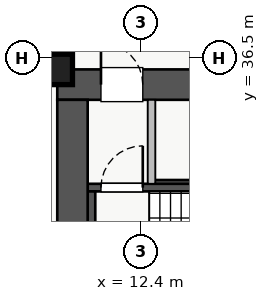
"""IFC4 building model, lengths in metres.
Left out: names, types, materials, properties, quantities, classifications, styles, units other than length and angle.
Written with IfcOpenShell. Run it as: python <this file> out.ifc"""

import sys

from ifc_helpers import new_model, si_unit, direction, frame, frame_2d, origin, origin_2d, place, context, subcontext, project, spatial, rectangle, extrude, source, transform, mapped, element, fill, save


model = new_model("IFC4")
c1 = context("Model", 3, precision=1e-05, world=origin(), true_north=direction((0.0, 1.0)))
c2 = subcontext(c1, "Body", "Model", "MODEL_VIEW")
j1 = project(units=[si_unit("LENGTHUNIT", "METRE"), si_unit("PLANEANGLEUNIT", "RADIAN")], contexts=[c1])
p1 = place(None, origin())
s1 = spatial("IfcSite", under=j1, at=p1, CompositionType="ELEMENT")
p2 = place(p1, origin())
s2 = spatial("IfcBuilding", under=s1, at=p2, CompositionType="ELEMENT")
p3 = place(p2, frame((0.0, 0.0, -4.8)))
s3 = spatial("IfcBuildingStorey", under=s2, at=p3, CompositionType="ELEMENT", Elevation=-4.8)
p4 = place(p3, frame((12.68, 33.2, 0.0), z_axis=(0.0, 0.0, 1.0), x_axis=(1.0, 0.0, 0.0)))
e1 = element("IfcWall", 1, at=p4, inside=s3, PredefinedType="SHEAR", context=c2, shape_type="SweptSolid", body=[
    extrude(rectangle(XDim=1.94, YDim=0.18, at=frame_2d((0.97, 0.0))), origin(), (0.0, 0.0, 1.0), 4.58),
])
p5 = place(p3, frame((11.0, 33.09, 0.0), z_axis=(0.0, 0.0, 1.0), x_axis=(1.0, 0.0, 0.0)))
e2 = element("IfcWall", 2, at=p5, inside=s3, PredefinedType="SHEAR", context=c2, shape_type="SweptSolid", body=[
    extrude(rectangle(XDim=7.15, YDim=0.2, at=frame_2d((3.575, 0.0))), origin(), (0.0, 0.0, 1.0), 4.8),
])
p6 = place(p5, frame((0.35, 0.0, 0.0)))
e3 = element("IfcOpeningElement", 3, at=p6, cuts=e2, PredefinedType="OPENING", context=c2, shape_type="SweptSolid", body=[
    extrude(rectangle(XDim=1.1, YDim=2.05, at=frame_2d((0.55, 1.025))), frame((0.0, 0.11, 0.0), z_axis=(0.0, -1.0, 0.0), x_axis=(1.0, 0.0, 0.0)), (0.0, 0.0, 1.0), 0.22),
])
p7 = place(p3, frame((11.1, 30.05, 0.0), z_axis=(0.0, 0.0, 1.0), x_axis=(0.0, 1.0, 0.0)))
e4 = element("IfcWall", 4, at=p7, inside=s3, PredefinedType="SHEAR", context=c2, shape_type="SweptSolid", body=[
    extrude(rectangle(XDim=2.94, YDim=0.2, at=frame_2d((1.47, 0.0))), origin(), (0.0, 0.0, 1.0), 4.8),
])
p8 = place(p3, frame((10.2, 35.8, 0.0), z_axis=(0.0, 0.0, 1.0), x_axis=(1.0, 0.0, 0.0)))
e5 = element("IfcWall", 5, at=p8, inside=s3, PredefinedType="SHEAR", context=c2, shape_type="SweptSolid", body=[
    extrude(rectangle(XDim=17.6, YDim=0.8, at=frame_2d((8.8, 0.0))), origin(), (0.0, 0.0, 1.0), 4.8),
])
p9 = place(p8, frame((1.15, 0.0, 0.0)))
e6 = element("IfcOpeningElement", 6, at=p9, cuts=e5, PredefinedType="OPENING", context=c2, shape_type="SweptSolid", body=[
    extrude(rectangle(XDim=1.1, YDim=2.05, at=frame_2d((0.55, 1.025))), frame((0.0, 0.41, 0.0), z_axis=(0.0, -1.0, 0.0), x_axis=(1.0, 0.0, 0.0)), (0.0, 0.0, 1.0), 0.82),
])
p10 = place(p8, frame((8.3, 0.0, 0.0)))
e7 = element("IfcOpeningElement", 7, at=p10, cuts=e5, PredefinedType="OPENING", context=c2, shape_type="SweptSolid", body=[
    extrude(rectangle(XDim=1.1, YDim=2.05, at=frame_2d((0.55, 1.025))), frame((0.0, 0.41, 0.0), z_axis=(0.0, -1.0, 0.0), x_axis=(1.0, 0.0, 0.0)), (0.0, 0.0, 1.0), 0.82),
])
p11 = place(p8, frame((10.05, 0.0, 0.0)))
e8 = element("IfcOpeningElement", 8, at=p11, cuts=e5, PredefinedType="OPENING", context=c2, shape_type="SweptSolid", body=[
    extrude(rectangle(XDim=1.1, YDim=2.05, at=frame_2d((0.55, 1.025))), frame((0.0, 0.41, 0.0), z_axis=(0.0, -1.0, 0.0), x_axis=(1.0, 0.0, 0.0)), (0.0, 0.0, 1.0), 0.82),
])
p12 = place(p8, frame((14.74, 0.0, 0.0)))
e9 = element("IfcOpeningElement", 9, at=p12, cuts=e5, PredefinedType="OPENING", context=c2, shape_type="SweptSolid", body=[
    extrude(rectangle(XDim=1.0, YDim=2.05, at=frame_2d((0.5, 1.025))), frame((0.0, 0.41, 0.0), z_axis=(0.0, -1.0, 0.0), x_axis=(1.0, 0.0, 0.0)), (0.0, 0.0, 1.0), 0.82),
])
p13 = place(p8, frame((12.585, 0.0, 0.0)))
e10 = element("IfcOpeningElement", 10, at=p13, cuts=e5, PredefinedType="OPENING", context=c2, shape_type="SweptSolid", body=[
    extrude(rectangle(XDim=1.0, YDim=2.05, at=frame_2d((0.5, 1.025))), frame((0.0, 0.41, 0.0), z_axis=(0.0, -1.0, 0.0), x_axis=(1.0, 0.0, 0.0)), (0.0, 0.0, 1.0), 0.82),
])
p14 = place(p3, frame((10.6, 29.8, 0.0), z_axis=(0.0, 0.0, 1.0), x_axis=(0.0, 1.0, 0.0)))
e11 = element("IfcWall", 11, at=p14, inside=s3, PredefinedType="SHEAR", context=c2, shape_type="SweptSolid", body=[
    extrude(rectangle(XDim=5.6, YDim=0.8, at=frame_2d((2.8, 0.0))), origin(), (0.0, 0.0, 1.0), 4.8),
])
m1 = source(origin(), c2, "Body", "SweptSolid", [
    extrude(rectangle(XDim=0.8, YDim=0.8, at=origin_2d()), origin(), (0.0, 0.0, 1.0), 4.8),
])
p15 = place(p3, frame((10.2, 36.2, 0.0), z_axis=(0.0, 0.0, 1.0), x_axis=(1.0, 0.0, 0.0)))
e12 = element("IfcColumn", 12, at=p15, inside=s3, PredefinedType="PILASTER", context=c2, shape_type="MappedRepresentation", body=[
    mapped(m1, transform((0.0, 0.0, 0.0), x_axis=(1.0, 0.0, 0.0), y_axis=(0.0, 1.0, 0.0), z_axis=(0.0, 0.0, 1.0), scale=1.0)),
])
p16 = place(p3, frame((12.68, 33.19, 0.0), z_axis=(0.0, 0.0, 1.0), x_axis=(0.0, 1.0, 0.0)))
e13 = element("IfcWall", 13, at=p16, inside=s3, PredefinedType="PARTITIONING", context=c2, shape_type="SweptSolid", body=[
    extrude(rectangle(XDim=2.21, YDim=0.2, at=frame_2d((1.105, 0.0))), origin(), (0.0, 0.0, 1.0), 4.58),
])
m2 = source(origin(), c2, "Body", "SweptSolid", [
    extrude(rectangle(XDim=1.1, YDim=2.05, at=frame_2d((0.55, 1.025))), frame((0.0, 0.025, 0.0), z_axis=(0.0, -1.0, 0.0), x_axis=(1.0, 0.0, 0.0)), (0.0, 0.0, 1.0), 0.05),
])
p17 = place(p9, origin())
e14 = element("IfcDoor", 14, at=p17, inside=s3, OperationType="SINGLE_SWING_LEFT", PredefinedType="DOOR", context=c2, shape_type="MappedRepresentation", body=[
    mapped(m2, transform((0.0, 0.0, 0.0), x_axis=(1.0, 0.0, 0.0), y_axis=(0.0, 1.0, 0.0), z_axis=(0.0, 0.0, 1.0), scale=1.0)),
])
fill(e6, e14)
p18 = place(p6, origin())
e15 = element("IfcDoor", 15, at=p18, inside=s3, OperationType="SINGLE_SWING_RIGHT", PredefinedType="DOOR", context=c2, shape_type="MappedRepresentation", body=[
    mapped(m2, transform((0.0, 0.0, 0.0), x_axis=(1.0, 0.0, 0.0), y_axis=(0.0, 1.0, 0.0), z_axis=(0.0, 0.0, 1.0), scale=1.0)),
])
fill(e3, e15)
save(model, sys.argv[1])
